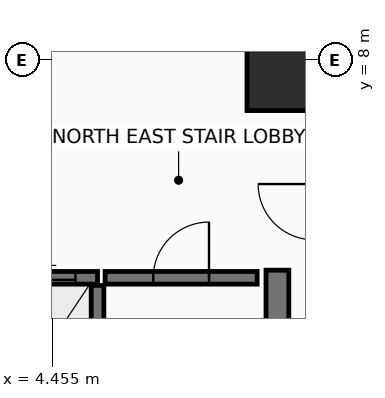
"""IFC4 building model, lengths in metres.
Left out: names, types, materials, properties, quantities, classifications, styles, units other than length and angle.
Written with IfcOpenShell. Run it as: python <this file> out.ifc"""

import sys

from ifc_helpers import new_model, si_unit, direction, frame, frame_2d, origin, origin_2d, place, context, subcontext, project, spatial, rectangle, extrude, element, fill, save


model = new_model("IFC4")
c1 = context("Model", 3, precision=1e-05, world=origin(), true_north=direction((0.0, 1.0)))
c2 = subcontext(c1, "Body", "Model", "MODEL_VIEW")
j1 = project(units=[si_unit("LENGTHUNIT", "METRE"), si_unit("PLANEANGLEUNIT", "RADIAN")], contexts=[c1])
p1 = place(None, origin())
s1 = spatial("IfcSite", under=j1, at=p1, CompositionType="ELEMENT")
p2 = place(p1, origin())
s2 = spatial("IfcBuilding", under=s1, at=p2, CompositionType="ELEMENT")
p3 = place(p2, frame((0.0, 0.0, 153.2)))
s3 = spatial("IfcBuildingStorey", under=s2, at=p3, CompositionType="ELEMENT", Elevation=153.2)
p4 = place(p3, frame((8.9, 7.6, 0.0), z_axis=(0.0, 0.0, 1.0), x_axis=(1.0, 0.0, 0.0)))
e1 = element("IfcColumn", 1, at=p4, inside=s3, PredefinedType="COLUMN", context=c2, shape_type="SweptSolid", body=[
    extrude(rectangle(XDim=1.2, YDim=1.2, at=origin_2d()), origin(), (0.0, 0.0, 1.0), 3.6),
])
p5 = place(p3, frame((8.9, -6.85, 0.0), z_axis=(0.0, 0.0, 1.0), x_axis=(0.0, 1.0, 0.0)))
e2 = element("IfcWall", 2, at=p5, inside=s3, PredefinedType="SHEAR", context=c2, shape_type="SweptSolid", body=[
    extrude(rectangle(XDim=10.7, YDim=0.45, at=frame_2d((5.35, 0.0))), origin(), (0.0, 0.0, 1.0), 3.41),
])
p6 = place(p3, frame((5.35, -3.75, 0.0), z_axis=(0.0, 0.0, 1.0), x_axis=(0.0, 1.0, 0.0)))
e3 = element("IfcWall", 3, at=p6, inside=s3, PredefinedType="SHEAR", context=c2, shape_type="SweptSolid", body=[
    extrude(rectangle(XDim=7.3, YDim=0.25, at=frame_2d((3.65, 0.0))), origin(), (0.0, 0.0, 1.0), 3.41),
])
p7 = place(p3, frame((5.5, 3.7, 0.0), z_axis=(0.0, 0.0, 1.0), x_axis=(1.0, 0.0, 0.0)))
e4 = element("IfcWall", 4, at=p7, inside=s3, PredefinedType="SHEAR", context=c2, shape_type="SweptSolid", body=[
    extrude(rectangle(XDim=3.0, YDim=0.25, at=frame_2d((1.5, 0.0))), origin(), (0.0, 0.0, 1.0), 3.41),
])
p8 = place(p7, frame((0.95, 0.0, 0.0)))
e5 = element("IfcOpeningElement", 5, at=p8, cuts=e4, PredefinedType="OPENING", context=c2, shape_type="SweptSolid", body=[
    extrude(rectangle(XDim=1.1, YDim=2.15, at=frame_2d((0.55, 1.075))), frame((0.0, 0.135, 0.0), z_axis=(0.0, -1.0, 0.0), x_axis=(1.0, 0.0, 0.0)), (0.0, 0.0, 1.0), 0.27),
])
p9 = place(p3, frame((3.28, 3.7, 0.0), z_axis=(0.0, 0.0, 1.0), x_axis=(1.0, 0.0, 0.0)))
e6 = element("IfcWall", 6, at=p9, inside=s3, PredefinedType="SHEAR", context=c2, shape_type="SweptSolid", body=[
    extrude(rectangle(XDim=2.07, YDim=0.25, at=frame_2d((1.035, 0.0))), origin(), (0.0, 0.0, 1.0), 3.41),
])
p10 = place(p9, frame((0.435, 0.0, 0.0)))
e7 = element("IfcOpeningElement", 7, at=p10, cuts=e6, PredefinedType="OPENING", context=c2, shape_type="SweptSolid", body=[
    extrude(rectangle(XDim=1.2, YDim=2.2, at=frame_2d((0.6, 1.1))), frame((0.0, 0.135, 0.0), z_axis=(0.0, -1.0, 0.0), x_axis=(1.0, 0.0, 0.0)), (0.0, 0.0, 1.0), 0.27),
])
p11 = place(p8, frame((1.1, 0.0, 0.0), z_axis=(0.0, 0.0, 1.0), x_axis=(-1.0, 0.0, 0.0)))
e8 = element("IfcDoor", 8, at=p11, inside=s3, OperationType="SINGLE_SWING_LEFT", PredefinedType="DOOR", context=c2, shape_type="SweptSolid", body=[
    extrude(rectangle(XDim=1.1, YDim=2.15, at=frame_2d((0.55, 1.075))), frame((0.0, 0.025, 0.0), z_axis=(0.0, -1.0, 0.0), x_axis=(1.0, 0.0, 0.0)), (0.0, 0.0, 1.0), 0.05),
])
fill(e5, e8)
p12 = place(p10, origin())
e9 = element("IfcDoor", 9, at=p12, inside=s3, OperationType="SLIDING_TO_RIGHT", PredefinedType="DOOR", context=c2, shape_type="SweptSolid", body=[
    extrude(rectangle(XDim=1.2, YDim=2.2, at=frame_2d((0.6, 1.1))), frame((0.0, 0.025, 0.0), z_axis=(0.0, -1.0, 0.0), x_axis=(1.0, 0.0, 0.0)), (0.0, 0.0, 1.0), 0.05),
])
fill(e7, e9)
save(model, sys.argv[1])
